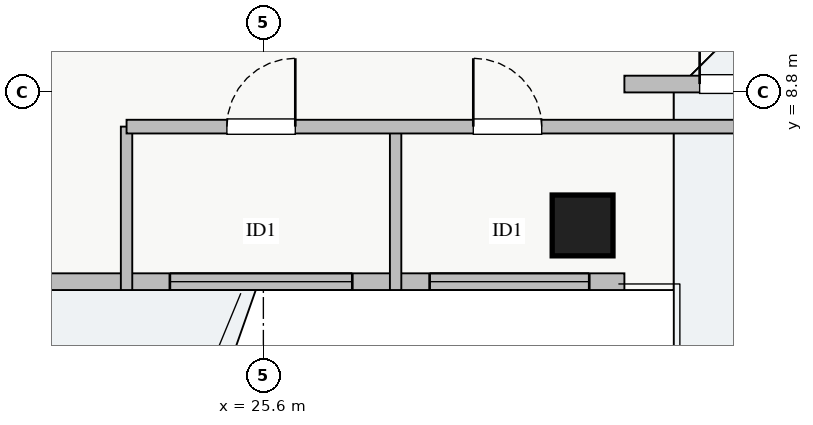
"""IFC4 building model, lengths in metres.
Left out: names, types, materials, properties, quantities, classifications, styles, units other than length and angle.
Written with IfcOpenShell. Run it as: python <this file> out.ifc"""

import sys

from ifc_helpers import new_model, si_unit, direction, frame, frame_2d, origin, origin_2d, place, context, subcontext, project, spatial, rectangle, extrude, source, transform, mapped, element, fill, save


model = new_model("IFC4")
c1 = context("Model", 3, precision=1e-05, world=origin(), true_north=direction((0.0, 1.0)))
c2 = subcontext(c1, "Body", "Model", "MODEL_VIEW")
j1 = project(units=[si_unit("LENGTHUNIT", "METRE"), si_unit("PLANEANGLEUNIT", "RADIAN")], contexts=[c1])
p1 = place(None, origin())
s1 = spatial("IfcSite", under=j1, at=p1, CompositionType="ELEMENT")
p2 = place(p1, origin())
s2 = spatial("IfcBuilding", under=s1, at=p2, CompositionType="ELEMENT")
p3 = place(p2, frame((0.0, 0.0, 203.5)))
s3 = spatial("IfcBuildingStorey", under=s2, at=p3, CompositionType="ELEMENT", Elevation=203.5)
m1 = source(origin(), c2, "Body", "SweptSolid", [
    extrude(rectangle(XDim=0.8, YDim=0.8, at=origin_2d()), origin(), (0.0, 0.0, 1.0), 3.25),
])
p4 = place(p3, frame((29.8, 7.05, 0.0), z_axis=(0.0, 0.0, 1.0), x_axis=(1.0, 0.0, 0.0)))
e1 = element("IfcColumn", 1, at=p4, inside=s3, PredefinedType="COLUMN", context=c2, shape_type="MappedRepresentation", body=[
    mapped(m1, transform((0.0, 0.0, 0.0), x_axis=(1.0, 0.0, 0.0), y_axis=(0.0, 1.0, 0.0), z_axis=(0.0, 0.0, 1.0), scale=1.0)),
])
p5 = place(p3, frame((7.65, 6.31, 0.0), z_axis=(0.0, 0.0, 1.0), x_axis=(1.0, 0.0, 0.0)))
e2 = element("IfcWall", 2, at=p5, inside=s3, PredefinedType="STANDARD", context=c2, shape_type="SweptSolid", body=[
    extrude(rectangle(XDim=22.7, YDim=0.22, at=frame_2d((11.35, 0.0))), origin(), (0.0, 0.0, 1.0), 2.61),
])
p6 = place(p5, frame((12.2, 0.0, 0.0)))
e3 = element("IfcOpeningElement", 3, at=p6, cuts=e2, PredefinedType="OPENING", context=c2, shape_type="SweptSolid", body=[
    extrude(rectangle(XDim=1.2, YDim=2.1, at=frame_2d((0.6, 1.05))), frame((0.0, 0.12, 0.0), z_axis=(0.0, -1.0, 0.0), x_axis=(1.0, 0.0, 0.0)), (0.0, 0.0, 1.0), 0.24),
])
p7 = place(p5, frame((1.637, 0.0, 0.9)))
e4 = element("IfcOpeningElement", 4, at=p7, cuts=e2, PredefinedType="OPENING", context=c2, shape_type="SweptSolid", body=[
    extrude(rectangle(XDim=2.4, YDim=1.48, at=frame_2d((1.2, 0.74))), frame((0.0, 0.12, 0.0), z_axis=(0.0, -1.0, 0.0), x_axis=(1.0, 0.0, 0.0)), (0.0, 0.0, 1.0), 0.24),
])
p8 = place(p5, frame((7.612, 0.0, 0.9)))
e5 = element("IfcOpeningElement", 5, at=p8, cuts=e2, PredefinedType="OPENING", context=c2, shape_type="SweptSolid", body=[
    extrude(rectangle(XDim=1.8, YDim=1.45, at=frame_2d((0.9, 0.725))), frame((0.0, 0.12, 0.0), z_axis=(0.0, -1.0, 0.0), x_axis=(1.0, 0.0, 0.0)), (0.0, 0.0, 1.0), 0.24),
])
p9 = place(p5, frame((20.137, 0.0, 0.9)))
e6 = element("IfcOpeningElement", 6, at=p9, cuts=e2, PredefinedType="OPENING", context=c2, shape_type="SweptSolid", body=[
    extrude(rectangle(XDim=2.1, YDim=1.5, at=frame_2d((1.05, 0.75))), frame((0.0, 0.12, 0.0), z_axis=(0.0, -1.0, 0.0), x_axis=(1.0, 0.0, 0.0)), (0.0, 0.0, 1.0), 0.24),
])
p10 = place(p5, frame((16.72, 0.0, 0.9)))
e7 = element("IfcOpeningElement", 7, at=p10, cuts=e2, PredefinedType="OPENING", context=c2, shape_type="SweptSolid", body=[
    extrude(rectangle(XDim=2.4, YDim=1.5, at=frame_2d((1.2, 0.75))), frame((0.0, 0.12, 0.0), z_axis=(0.0, -1.0, 0.0), x_axis=(1.0, 0.0, 0.0)), (0.0, 0.0, 1.0), 0.24),
])
p11 = place(p3, frame((30.35, 8.91, 0.0), z_axis=(0.0, 0.0, 1.0), x_axis=(1.0, 0.0, 0.0)))
e8 = element("IfcWall", 8, at=p11, inside=s3, PredefinedType="STANDARD", context=c2, shape_type="SweptSolid", body=[
    extrude(rectangle(XDim=2.74, YDim=0.22, at=frame_2d((1.37, 0.0))), origin(), (0.0, 0.0, 1.0), 2.61),
])
p12 = place(p11, frame((0.99, 0.0, 0.0)))
e9 = element("IfcOpeningElement", 9, at=p12, cuts=e8, PredefinedType="OPENING", context=c2, shape_type="SweptSolid", body=[
    extrude(rectangle(XDim=1.2, YDim=2.1, at=frame_2d((0.6, 1.05))), frame((0.0, 0.12, 0.0), z_axis=(0.0, -1.0, 0.0), x_axis=(1.0, 0.0, 0.0)), (0.0, 0.0, 1.0), 0.24),
])
for number, where, z_axis, x_axis in (
    (10, (23.8, 6.2, 0.0), (0.0, 0.0, 1.0), (0.0, 1.0, 0.0)),
    (11, (27.34, 6.2, 0.0), (0.0, 0.0, 1.0), (0.0, 1.0, 0.0)),
):
    element("IfcWall", number, at=place(p3, frame(where, z_axis=z_axis, x_axis=x_axis)), inside=s3, PredefinedType="PARTITIONING", context=c2, shape_type="SweptSolid", body=[
        extrude(rectangle(XDim=2.15, YDim=0.15, at=frame_2d((1.075, 0.0))), origin(), (0.0, 0.0, 1.0), 3.07),
    ])
p13 = place(p3, frame((23.8, 8.35, 0.0), z_axis=(0.0, 0.0, 1.0), x_axis=(1.0, 0.0, 0.0)))
e12 = element("IfcWall", 12, at=p13, inside=s3, PredefinedType="PARTITIONING", context=c2, shape_type="SweptSolid", body=[
    extrude(rectangle(XDim=8.65, YDim=0.18, at=frame_2d((4.325, 0.0))), origin(), (0.0, 0.0, 1.0), 3.07),
])
p14 = place(p13, frame((1.32, 0.0, 0.0)))
e13 = element("IfcOpeningElement", 13, at=p14, cuts=e12, PredefinedType="OPENING", context=c2, shape_type="SweptSolid", body=[
    extrude(rectangle(XDim=0.9, YDim=2.05, at=frame_2d((0.45, 1.025))), frame((0.0, 0.1, 0.0), z_axis=(0.0, -1.0, 0.0), x_axis=(1.0, 0.0, 0.0)), (0.0, 0.0, 1.0), 0.2),
])
p15 = place(p13, frame((4.562, 0.0, 0.0)))
e14 = element("IfcOpeningElement", 14, at=p15, cuts=e12, PredefinedType="OPENING", context=c2, shape_type="SweptSolid", body=[
    extrude(rectangle(XDim=0.9, YDim=2.05, at=frame_2d((0.45, 1.025))), frame((0.0, 0.1, 0.0), z_axis=(0.0, -1.0, 0.0), x_axis=(1.0, 0.0, 0.0)), (0.0, 0.0, 1.0), 0.2),
])
m2 = source(origin(), c2, "Body", "SweptSolid", [
    extrude(rectangle(XDim=2.1, YDim=1.5, at=frame_2d((1.05, 0.75))), frame((0.0, 0.03, 0.0), z_axis=(0.0, -1.0, 0.0), x_axis=(1.0, 0.0, 0.0)), (0.0, 0.0, 1.0), 0.06),
])
p16 = place(p9, origin())
e15 = element("IfcWindow", 15, at=p16, inside=s3, PartitioningType="TRIPLE_PANEL_VERTICAL", PredefinedType="WINDOW", context=c2, shape_type="MappedRepresentation", body=[
    mapped(m2, transform((0.0, 0.0, 0.0), x_axis=(1.0, 0.0, 0.0), y_axis=(0.0, 1.0, 0.0), z_axis=(0.0, 0.0, 1.0), scale=1.0)),
])
fill(e6, e15)
m3 = source(origin(), c2, "Body", "SweptSolid", [
    extrude(rectangle(XDim=1.2, YDim=2.1, at=frame_2d((0.6, 1.05))), frame((0.0, 0.025, 0.0), z_axis=(0.0, -1.0, 0.0), x_axis=(1.0, 0.0, 0.0)), (0.0, 0.0, 1.0), 0.05),
])
p17 = place(p12, origin())
e16 = element("IfcDoor", 16, at=p17, inside=s3, OperationType="SINGLE_SWING_LEFT", PredefinedType="DOOR", context=c2, shape_type="MappedRepresentation", body=[
    mapped(m3, transform((0.0, 0.0, 0.0), x_axis=(1.0, 0.0, 0.0), y_axis=(0.0, 1.0, 0.0), z_axis=(0.0, 0.0, 1.0), scale=1.0)),
])
fill(e9, e16)
m4 = source(origin(), c2, "Body", "SweptSolid", [
    extrude(rectangle(XDim=0.9, YDim=2.05, at=frame_2d((0.45, 1.025))), frame((0.0, 0.025, 0.0), z_axis=(0.0, -1.0, 0.0), x_axis=(1.0, 0.0, 0.0)), (0.0, 0.0, 1.0), 0.05),
])
p18 = place(p14, origin())
e17 = element("IfcDoor", 17, at=p18, inside=s3, OperationType="SINGLE_SWING_RIGHT", PredefinedType="DOOR", context=c2, shape_type="MappedRepresentation", body=[
    mapped(m4, transform((0.0, 0.0, 0.0), x_axis=(1.0, 0.0, 0.0), y_axis=(0.0, 1.0, 0.0), z_axis=(0.0, 0.0, 1.0), scale=1.0)),
])
fill(e13, e17)
p19 = place(p15, origin())
e18 = element("IfcDoor", 18, at=p19, inside=s3, OperationType="SINGLE_SWING_LEFT", PredefinedType="DOOR", context=c2, shape_type="MappedRepresentation", body=[
    mapped(m4, transform((0.0, 0.0, 0.0), x_axis=(1.0, 0.0, 0.0), y_axis=(0.0, 1.0, 0.0), z_axis=(0.0, 0.0, 1.0), scale=1.0)),
])
fill(e14, e18)
m5 = source(origin(), c2, "Body", "SweptSolid", [
    extrude(rectangle(XDim=2.4, YDim=1.5, at=frame_2d((1.2, 0.75))), frame((0.0, 0.03, 0.0), z_axis=(0.0, -1.0, 0.0), x_axis=(1.0, 0.0, 0.0)), (0.0, 0.0, 1.0), 0.06),
])
p20 = place(p10, origin())
e19 = element("IfcWindow", 19, at=p20, inside=s3, PartitioningType="TRIPLE_PANEL_VERTICAL", PredefinedType="WINDOW", context=c2, shape_type="MappedRepresentation", body=[
    mapped(m5, transform((0.0, 0.0, 0.0), x_axis=(1.0, 0.0, 0.0), y_axis=(0.0, 1.0, 0.0), z_axis=(0.0, 0.0, 1.0), scale=1.0)),
])
fill(e7, e19)
save(model, sys.argv[1])
